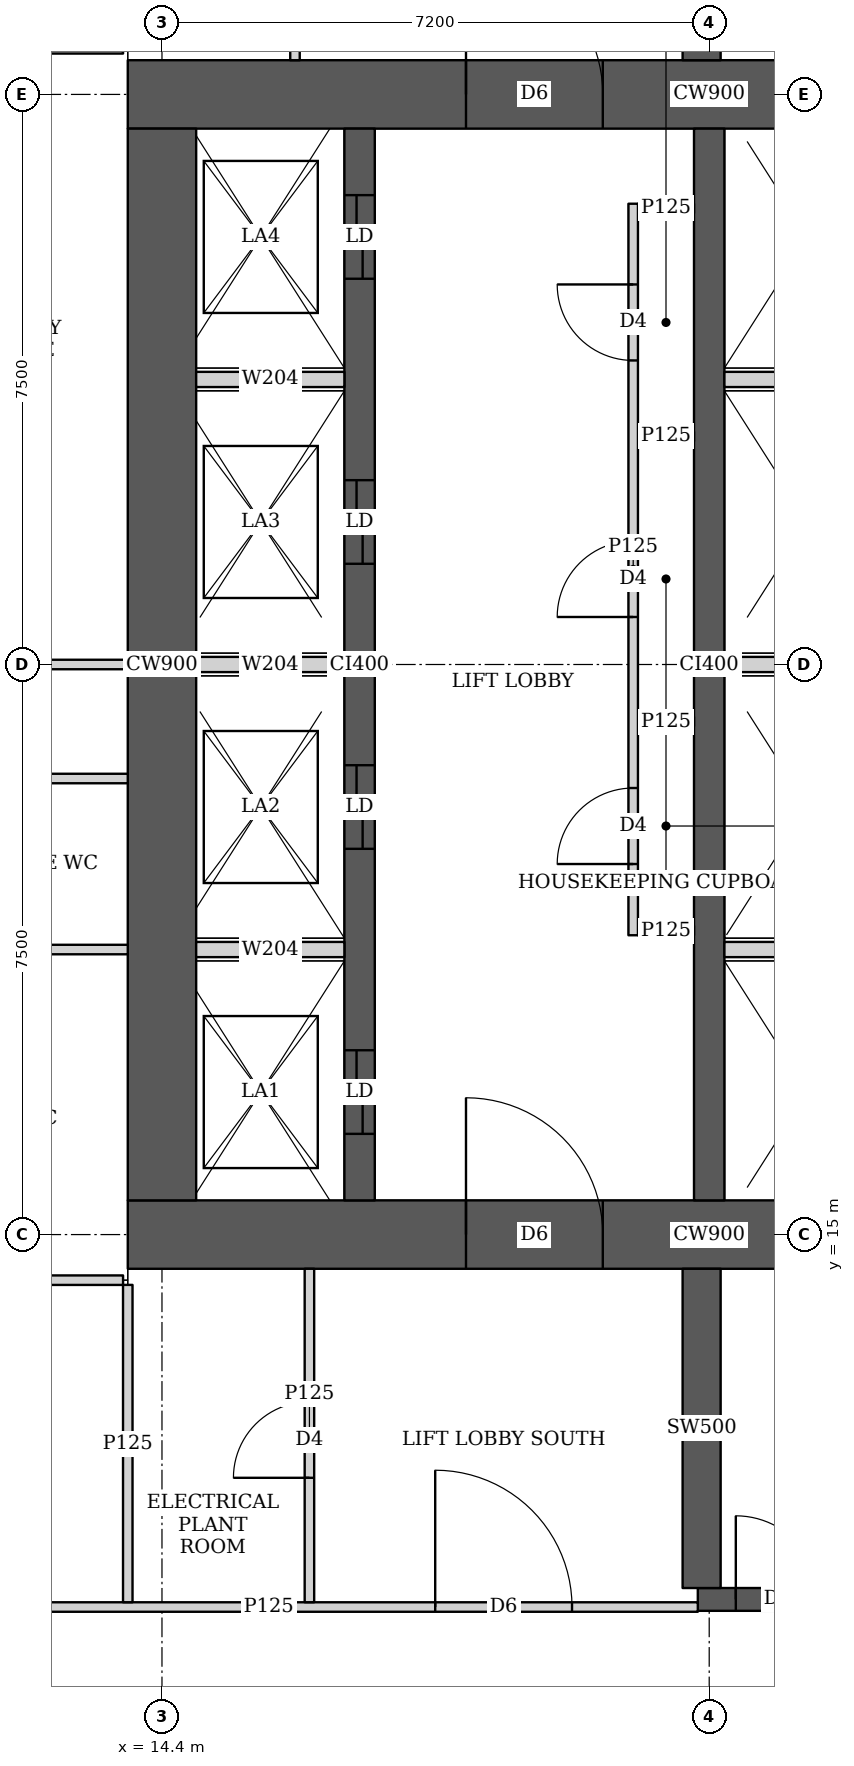
"""IFC4 building model, lengths in metres.
Left out: names, types, materials, properties, quantities, classifications, styles, units other than length and angle.
Written with IfcOpenShell. Run it as: python <this file> out.ifc"""

import sys

from ifc_helpers import new_model, si_unit, direction, frame, frame_2d, origin, place, context, subcontext, project, spatial, rectangle, extrude, element, fill, save


model = new_model("IFC4")
c1 = context("Model", 3, precision=1e-05, world=origin(), true_north=direction((0.0, 1.0)))
c2 = subcontext(c1, "Body", "Model", "MODEL_VIEW")
j1 = project(units=[si_unit("LENGTHUNIT", "METRE"), si_unit("PLANEANGLEUNIT", "RADIAN")], contexts=[c1])
p1 = place(None, origin())
s1 = spatial("IfcSite", under=j1, at=p1, CompositionType="ELEMENT")
p2 = place(p1, origin())
s2 = spatial("IfcBuilding", under=s1, at=p2, CompositionType="ELEMENT")
p3 = place(p2, frame((0.0, 0.0, 72.5)))
s3 = spatial("IfcBuildingStorey", under=s2, at=p3, CompositionType="ELEMENT", Elevation=72.5)
p4 = place(p3, frame((13.95, 15.0, 0.0), z_axis=(0.0, 0.0, 1.0), x_axis=(1.0, 0.0, 0.0)))
e1 = element("IfcWall", 1, at=p4, inside=s3, PredefinedType="SHEAR", context=c2, shape_type="SweptSolid", body=[
    extrude(rectangle(XDim=15.3, YDim=0.9, at=frame_2d((7.65, 0.0))), origin(), (0.0, 0.0, 1.0), 5.4),
])
p5 = place(p4, frame((4.45, 0.0, 0.0)))
e2 = element("IfcOpeningElement", 2, at=p5, cuts=e1, PredefinedType="OPENING", context=c2, shape_type="SweptSolid", body=[
    extrude(rectangle(XDim=1.8, YDim=2.1, at=frame_2d((0.9, 1.05))), frame((0.0, 0.46, 0.0), z_axis=(0.0, -1.0, 0.0), x_axis=(1.0, 0.0, 0.0)), (0.0, 0.0, 1.0), 0.92),
])
p6 = place(p4, frame((10.7, 0.0, 0.0)))
e3 = element("IfcOpeningElement", 3, at=p6, cuts=e1, PredefinedType="OPENING", context=c2, shape_type="SweptSolid", body=[
    extrude(rectangle(XDim=1.1, YDim=2.1, at=frame_2d((0.55, 1.05))), frame((0.0, 0.46, 0.0), z_axis=(0.0, -1.0, 0.0), x_axis=(1.0, 0.0, 0.0)), (0.0, 0.0, 1.0), 0.92),
])
p7 = place(p3, frame((13.95, 30.0, 0.0), z_axis=(0.0, 0.0, 1.0), x_axis=(1.0, 0.0, 0.0)))
e4 = element("IfcWall", 4, at=p7, inside=s3, PredefinedType="SHEAR", context=c2, shape_type="SweptSolid", body=[
    extrude(rectangle(XDim=15.3, YDim=0.9, at=frame_2d((7.65, 0.0))), origin(), (0.0, 0.0, 1.0), 5.4),
])
p8 = place(p7, frame((4.45, 0.0, 0.0)))
e5 = element("IfcOpeningElement", 5, at=p8, cuts=e4, PredefinedType="OPENING", context=c2, shape_type="SweptSolid", body=[
    extrude(rectangle(XDim=1.8, YDim=2.1, at=frame_2d((0.9, 1.05))), frame((0.0, 0.46, 0.0), z_axis=(0.0, -1.0, 0.0), x_axis=(1.0, 0.0, 0.0)), (0.0, 0.0, 1.0), 0.92),
])
p9 = place(p7, frame((10.7, 0.0, 0.0)))
e6 = element("IfcOpeningElement", 6, at=p9, cuts=e4, PredefinedType="OPENING", context=c2, shape_type="SweptSolid", body=[
    extrude(rectangle(XDim=1.1, YDim=2.1, at=frame_2d((0.55, 1.05))), frame((0.0, 0.46, 0.0), z_axis=(0.0, -1.0, 0.0), x_axis=(1.0, 0.0, 0.0)), (0.0, 0.0, 1.0), 0.92),
])
p10 = place(p3, frame((14.4, 15.45, 0.0), z_axis=(0.0, 0.0, 1.0), x_axis=(0.0, 1.0, 0.0)))
e7 = element("IfcWall", 7, at=p10, inside=s3, PredefinedType="SHEAR", context=c2, shape_type="SweptSolid", body=[
    extrude(rectangle(XDim=14.1, YDim=0.9, at=frame_2d((7.05, 0.0))), origin(), (0.0, 0.0, 1.0), 5.4),
])
p11 = place(p3, frame((17.0, 15.45, 0.0), z_axis=(0.0, 0.0, 1.0), x_axis=(0.0, 1.0, 0.0)))
e8 = element("IfcWall", 8, at=p11, inside=s3, PredefinedType="SHEAR", context=c2, shape_type="SweptSolid", body=[
    extrude(rectangle(XDim=14.1, YDim=0.4, at=frame_2d((7.05, 0.0))), origin(), (0.0, 0.0, 1.0), 5.4),
])
p12 = place(p11, frame((0.875, 0.0, 0.0)))
e9 = element("IfcOpeningElement", 9, at=p12, cuts=e8, PredefinedType="OPENING", context=c2, shape_type="SweptSolid", body=[
    extrude(rectangle(XDim=1.1, YDim=2.1, at=frame_2d((0.55, 1.05))), frame((0.0, 0.21, 0.0), z_axis=(0.0, -1.0, 0.0), x_axis=(1.0, 0.0, 0.0)), (0.0, 0.0, 1.0), 0.42),
])
p13 = place(p11, frame((4.625, 0.0, 0.0)))
e10 = element("IfcOpeningElement", 10, at=p13, cuts=e8, PredefinedType="OPENING", context=c2, shape_type="SweptSolid", body=[
    extrude(rectangle(XDim=1.1, YDim=2.1, at=frame_2d((0.55, 1.05))), frame((0.0, 0.21, 0.0), z_axis=(0.0, -1.0, 0.0), x_axis=(1.0, 0.0, 0.0)), (0.0, 0.0, 1.0), 0.42),
])
p14 = place(p11, frame((8.375, 0.0, 0.0)))
e11 = element("IfcOpeningElement", 11, at=p14, cuts=e8, PredefinedType="OPENING", context=c2, shape_type="SweptSolid", body=[
    extrude(rectangle(XDim=1.1, YDim=2.1, at=frame_2d((0.55, 1.05))), frame((0.0, 0.21, 0.0), z_axis=(0.0, -1.0, 0.0), x_axis=(1.0, 0.0, 0.0)), (0.0, 0.0, 1.0), 0.42),
])
p15 = place(p11, frame((12.125, 0.0, 0.0)))
e12 = element("IfcOpeningElement", 12, at=p15, cuts=e8, PredefinedType="OPENING", context=c2, shape_type="SweptSolid", body=[
    extrude(rectangle(XDim=1.1, YDim=2.1, at=frame_2d((0.55, 1.05))), frame((0.0, 0.21, 0.0), z_axis=(0.0, -1.0, 0.0), x_axis=(1.0, 0.0, 0.0)), (0.0, 0.0, 1.0), 0.42),
])
p16 = place(p3, frame((21.6, 15.45, 0.0), z_axis=(0.0, 0.0, 1.0), x_axis=(0.0, 1.0, 0.0)))
e13 = element("IfcWall", 13, at=p16, inside=s3, PredefinedType="SHEAR", context=c2, shape_type="SweptSolid", body=[
    extrude(rectangle(XDim=14.1, YDim=0.4, at=frame_2d((7.05, 0.0))), origin(), (0.0, 0.0, 1.0), 5.4),
])
p17 = place(p3, frame((21.45, 10.2, 0.0), z_axis=(0.0, 0.0, 1.0), x_axis=(1.0, 0.0, 0.0)))
e14 = element("IfcWall", 14, at=p17, inside=s3, PredefinedType="SHEAR", context=c2, shape_type="SweptSolid", body=[
    extrude(rectangle(XDim=7.5, YDim=0.3, at=frame_2d((3.75, 0.0))), origin(), (0.0, 0.0, 1.0), 5.4),
])
p18 = place(p17, frame((0.5, 0.0, 0.0)))
e15 = element("IfcOpeningElement", 15, at=p18, cuts=e14, PredefinedType="OPENING", context=c2, shape_type="SweptSolid", body=[
    extrude(rectangle(XDim=1.1, YDim=2.1, at=frame_2d((0.55, 1.05))), frame((0.0, 0.16, 0.0), z_axis=(0.0, -1.0, 0.0), x_axis=(1.0, 0.0, 0.0)), (0.0, 0.0, 1.0), 0.32),
])
for number, where, z_axis, x_axis in (
    (16, (21.5, 10.35, 0.0), (0.0, 0.0, 1.0), (0.0, 1.0, 0.0)),
    (17, (21.5, 30.45, 0.0), (0.0, 0.0, 1.0), (0.0, 1.0, 0.0)),
):
    element("IfcWall", number, at=place(p3, frame(where, z_axis=z_axis, x_axis=x_axis)), inside=s3, PredefinedType="SHEAR", context=c2, shape_type="SweptSolid", body=[
        extrude(rectangle(XDim=4.2, YDim=0.5, at=frame_2d((2.1, 0.0))), origin(), (0.0, 0.0, 1.0), 5.4),
    ])
p19 = place(p3, frame((10.163, 14.4, 0.0), z_axis=(0.0, 0.0, 1.0), x_axis=(1.0, 0.0, 0.0)))
e18 = element("IfcWall", 18, at=p19, inside=s3, PredefinedType="PARTITIONING", context=c2, shape_type="SweptSolid", body=[
    extrude(rectangle(XDim=3.725, YDim=0.125, at=frame_2d((1.862, 0.0))), origin(), (0.0, 0.0, 1.0), 3.55),
])
p20 = place(p3, frame((10.163, 22.5, 0.0), z_axis=(0.0, 0.0, 1.0), x_axis=(1.0, 0.0, 0.0)))
e19 = element("IfcWall", 19, at=p20, inside=s3, PredefinedType="PARTITIONING", context=c2, shape_type="SweptSolid", body=[
    extrude(rectangle(XDim=3.787, YDim=0.125, at=frame_2d((1.894, 0.0))), origin(), (0.0, 0.0, 1.0), 3.55),
])
p21 = place(p3, frame((10.163, 30.6, 0.0), z_axis=(0.0, 0.0, 1.0), x_axis=(1.0, 0.0, 0.0)))
e20 = element("IfcWall", 20, at=p21, inside=s3, PredefinedType="PARTITIONING", context=c2, shape_type="SweptSolid", body=[
    extrude(rectangle(XDim=3.725, YDim=0.125, at=frame_2d((1.862, 0.0))), origin(), (0.0, 0.0, 1.0), 3.55),
])
p22 = place(p3, frame((13.95, 10.163, 0.0), z_axis=(0.0, 0.0, 1.0), x_axis=(0.0, 1.0, 0.0)))
e21 = element("IfcWall", 21, at=p22, inside=s3, PredefinedType="PARTITIONING", context=c2, shape_type="SweptSolid", body=[
    extrude(rectangle(XDim=4.175, YDim=0.125, at=frame_2d((2.087, 0.0))), origin(), (0.0, 0.0, 1.0), 3.55),
])
p23 = place(p3, frame((10.163, 10.1, 0.0), z_axis=(0.0, 0.0, 1.0), x_axis=(1.0, 0.0, 0.0)))
e22 = element("IfcWall", 22, at=p23, inside=s3, PredefinedType="PARTITIONING", context=c2, shape_type="SweptSolid", body=[
    extrude(rectangle(XDim=11.287, YDim=0.125, at=frame_2d((5.644, 0.0))), origin(), (0.0, 0.0, 1.0), 3.15),
])
p24 = place(p23, frame((7.832, 0.0, 0.0)))
e23 = element("IfcOpeningElement", 23, at=p24, cuts=e22, PredefinedType="OPENING", context=c2, shape_type="SweptSolid", body=[
    extrude(rectangle(XDim=1.8, YDim=2.1, at=frame_2d((0.9, 1.05))), frame((0.0, 0.073, 0.0), z_axis=(0.0, -1.0, 0.0), x_axis=(1.0, 0.0, 0.0)), (0.0, 0.0, 1.0), 0.145),
])
p25 = place(p3, frame((16.34, 10.163, 0.0), z_axis=(0.0, 0.0, 1.0), x_axis=(0.0, 1.0, 0.0)))
e24 = element("IfcWall", 24, at=p25, inside=s3, PredefinedType="PARTITIONING", context=c2, shape_type="SweptSolid", body=[
    extrude(rectangle(XDim=4.387, YDim=0.125, at=frame_2d((2.193, 0.0))), origin(), (0.0, 0.0, 1.0), 5.15),
])
p26 = place(p25, frame((1.637, 0.0, 0.0)))
e25 = element("IfcOpeningElement", 25, at=p26, cuts=e24, PredefinedType="OPENING", context=c2, shape_type="SweptSolid", body=[
    extrude(rectangle(XDim=1.0, YDim=2.1, at=frame_2d((0.5, 1.05))), frame((0.0, 0.073, 0.0), z_axis=(0.0, -1.0, 0.0), x_axis=(1.0, 0.0, 0.0)), (0.0, 0.0, 1.0), 0.145),
])
p27 = place(p3, frame((16.15, 30.45, 0.0), z_axis=(0.0, 0.0, 1.0), x_axis=(0.0, 1.0, 0.0)))
e26 = element("IfcWall", 26, at=p27, inside=s3, PredefinedType="PARTITIONING", context=c2, shape_type="SweptSolid", body=[
    extrude(rectangle(XDim=4.387, YDim=0.125, at=frame_2d((2.193, 0.0))), origin(), (0.0, 0.0, 1.0), 5.15),
])
p28 = place(p27, frame((1.75, 0.0, 0.0)))
e27 = element("IfcOpeningElement", 27, at=p28, cuts=e26, PredefinedType="OPENING", context=c2, shape_type="SweptSolid", body=[
    extrude(rectangle(XDim=1.0, YDim=2.1, at=frame_2d((0.5, 1.05))), frame((0.0, 0.073, 0.0), z_axis=(0.0, -1.0, 0.0), x_axis=(1.0, 0.0, 0.0)), (0.0, 0.0, 1.0), 0.145),
])
for number, where, z_axis, x_axis in (
    (28, (10.163, 18.75, 0.0), (0.0, 0.0, 1.0), (1.0, 0.0, 0.0)),
    (29, (10.163, 21.0, 0.0), (0.0, 0.0, 1.0), (1.0, 0.0, 0.0)),
):
    element("IfcWall", number, at=place(p3, frame(where, z_axis=z_axis, x_axis=x_axis)), inside=s3, PredefinedType="PARTITIONING", context=c2, shape_type="SweptSolid", body=[
        extrude(rectangle(XDim=3.787, YDim=0.125, at=frame_2d((1.894, 0.0))), origin(), (0.0, 0.0, 1.0), 5.15),
    ])
p29 = place(p3, frame((20.6, 18.938, 0.0), z_axis=(0.0, 0.0, 1.0), x_axis=(0.0, 1.0, 0.0)))
e30 = element("IfcWall", 30, at=p29, inside=s3, PredefinedType="PARTITIONING", context=c2, shape_type="SweptSolid", body=[
    extrude(rectangle(XDim=9.624, YDim=0.125, at=frame_2d((4.812, 0.0))), origin(), (0.0, 0.0, 1.0), 5.15),
])
p30 = place(p29, frame((0.937, 0.0, 0.0)))
e31 = element("IfcOpeningElement", 31, at=p30, cuts=e30, PredefinedType="OPENING", context=c2, shape_type="SweptSolid", body=[
    extrude(rectangle(XDim=1.0, YDim=2.1, at=frame_2d((0.5, 1.05))), frame((0.0, 0.073, 0.0), z_axis=(0.0, -1.0, 0.0), x_axis=(1.0, 0.0, 0.0)), (0.0, 0.0, 1.0), 0.145),
])
p31 = place(p29, frame((4.187, 0.0, 0.0)))
e32 = element("IfcOpeningElement", 32, at=p31, cuts=e30, PredefinedType="OPENING", context=c2, shape_type="SweptSolid", body=[
    extrude(rectangle(XDim=1.0, YDim=2.1, at=frame_2d((0.5, 1.05))), frame((0.0, 0.073, 0.0), z_axis=(0.0, -1.0, 0.0), x_axis=(1.0, 0.0, 0.0)), (0.0, 0.0, 1.0), 0.145),
])
p32 = place(p29, frame((7.562, 0.0, 0.0)))
e33 = element("IfcOpeningElement", 33, at=p32, cuts=e30, PredefinedType="OPENING", context=c2, shape_type="SweptSolid", body=[
    extrude(rectangle(XDim=1.0, YDim=2.1, at=frame_2d((0.5, 1.05))), frame((0.0, 0.073, 0.0), z_axis=(0.0, -1.0, 0.0), x_axis=(1.0, 0.0, 0.0)), (0.0, 0.0, 1.0), 0.145),
])
for number, where, z_axis, x_axis in (
    (34, (20.663, 19.0, 0.0), (0.0, 0.0, 1.0), (1.0, 0.0, 0.0)),
    (35, (20.663, 28.5, 0.0), (0.0, 0.0, 1.0), (1.0, 0.0, 0.0)),
    (36, (20.663, 21.75, 0.0), (0.0, 0.0, 1.0), (1.0, 0.0, 0.0)),
    (37, (20.663, 25.5, 0.0), (0.0, 0.0, 1.0), (1.0, 0.0, 0.0)),
):
    element("IfcWall", number, at=place(p3, frame(where, z_axis=z_axis, x_axis=x_axis)), inside=s3, PredefinedType="PARTITIONING", context=c2, shape_type="SweptSolid", body=[
        extrude(rectangle(XDim=0.737, YDim=0.125, at=frame_2d((0.368, 0.0))), origin(), (0.0, 0.0, 1.0), 5.15),
    ])
p33 = place(p3, frame((14.85, 18.75, 0.0), z_axis=(0.0, 0.0, 1.0), x_axis=(1.0, 0.0, 0.0)))
e38 = element("IfcWall", 38, at=p33, inside=s3, PredefinedType="SOLIDWALL", context=c2, shape_type="SweptSolid", body=[
    extrude(rectangle(XDim=1.95, YDim=0.2, at=frame_2d((0.975, 0.0))), origin(), (0.0, 0.0, 1.0), 5.15),
])
p34 = place(p3, frame((21.8, 18.75, 0.0), z_axis=(0.0, 0.0, 1.0), x_axis=(1.0, 0.0, 0.0)))
e39 = element("IfcWall", 39, at=p34, inside=s3, PredefinedType="SOLIDWALL", context=c2, shape_type="SweptSolid", body=[
    extrude(rectangle(XDim=2.2, YDim=0.2, at=frame_2d((1.1, 0.0))), origin(), (0.0, 0.0, 1.0), 5.15),
])
p35 = place(p3, frame((14.85, 22.5, 0.0), z_axis=(0.0, 0.0, 1.0), x_axis=(1.0, 0.0, 0.0)))
e40 = element("IfcWall", 40, at=p35, inside=s3, PredefinedType="SOLIDWALL", context=c2, shape_type="SweptSolid", body=[
    extrude(rectangle(XDim=1.95, YDim=0.2, at=frame_2d((0.975, 0.0))), origin(), (0.0, 0.0, 1.0), 5.15),
])
p36 = place(p3, frame((21.8, 22.5, 0.0), z_axis=(0.0, 0.0, 1.0), x_axis=(1.0, 0.0, 0.0)))
e41 = element("IfcWall", 41, at=p36, inside=s3, PredefinedType="SOLIDWALL", context=c2, shape_type="SweptSolid", body=[
    extrude(rectangle(XDim=2.2, YDim=0.2, at=frame_2d((1.1, 0.0))), origin(), (0.0, 0.0, 1.0), 5.15),
])
p37 = place(p3, frame((14.85, 26.25, 0.0), z_axis=(0.0, 0.0, 1.0), x_axis=(1.0, 0.0, 0.0)))
e42 = element("IfcWall", 42, at=p37, inside=s3, PredefinedType="SOLIDWALL", context=c2, shape_type="SweptSolid", body=[
    extrude(rectangle(XDim=1.95, YDim=0.2, at=frame_2d((0.975, 0.0))), origin(), (0.0, 0.0, 1.0), 5.15),
])
p38 = place(p3, frame((21.8, 26.25, 0.0), z_axis=(0.0, 0.0, 1.0), x_axis=(1.0, 0.0, 0.0)))
e43 = element("IfcWall", 43, at=p38, inside=s3, PredefinedType="SOLIDWALL", context=c2, shape_type="SweptSolid", body=[
    extrude(rectangle(XDim=2.2, YDim=0.2, at=frame_2d((1.1, 0.0))), origin(), (0.0, 0.0, 1.0), 5.15),
])
p39 = place(p26, origin())
e44 = element("IfcDoor", 44, at=p39, inside=s3, OperationType="SINGLE_SWING_LEFT", PredefinedType="DOOR", context=c2, shape_type="SweptSolid", body=[
    extrude(rectangle(XDim=1.0, YDim=2.1, at=frame_2d((0.5, 1.05))), frame((0.0, 0.025, 0.0), z_axis=(0.0, -1.0, 0.0), x_axis=(1.0, 0.0, 0.0)), (0.0, 0.0, 1.0), 0.05),
])
fill(e25, e44)
p40 = place(p24, origin())
e45 = element("IfcDoor", 45, at=p40, inside=s3, OperationType="DOUBLE_DOOR_SINGLE_SWING", PredefinedType="DOOR", context=c2, shape_type="SweptSolid", body=[
    extrude(rectangle(XDim=1.8, YDim=2.1, at=frame_2d((0.9, 1.05))), frame((0.0, 0.025, 0.0), z_axis=(0.0, -1.0, 0.0), x_axis=(1.0, 0.0, 0.0)), (0.0, 0.0, 1.0), 0.05),
])
fill(e23, e45)
p41 = place(p30, origin())
e46 = element("IfcDoor", 46, at=p41, inside=s3, OperationType="SINGLE_SWING_LEFT", PredefinedType="DOOR", context=c2, shape_type="SweptSolid", body=[
    extrude(rectangle(XDim=1.0, YDim=2.1, at=frame_2d((0.5, 1.05))), frame((0.0, 0.025, 0.0), z_axis=(0.0, -1.0, 0.0), x_axis=(1.0, 0.0, 0.0)), (0.0, 0.0, 1.0), 0.05),
])
fill(e31, e46)
p42 = place(p31, origin())
e47 = element("IfcDoor", 47, at=p42, inside=s3, OperationType="SINGLE_SWING_LEFT", PredefinedType="DOOR", context=c2, shape_type="SweptSolid", body=[
    extrude(rectangle(XDim=1.0, YDim=2.1, at=frame_2d((0.5, 1.05))), frame((0.0, 0.025, 0.0), z_axis=(0.0, -1.0, 0.0), x_axis=(1.0, 0.0, 0.0)), (0.0, 0.0, 1.0), 0.05),
])
fill(e32, e47)
p43 = place(p32, origin())
e48 = element("IfcDoor", 48, at=p43, inside=s3, OperationType="SINGLE_SWING_RIGHT", PredefinedType="DOOR", context=c2, shape_type="SweptSolid", body=[
    extrude(rectangle(XDim=1.0, YDim=2.1, at=frame_2d((0.5, 1.05))), frame((0.0, 0.025, 0.0), z_axis=(0.0, -1.0, 0.0), x_axis=(1.0, 0.0, 0.0)), (0.0, 0.0, 1.0), 0.05),
])
fill(e33, e48)
p44 = place(p5, origin())
e49 = element("IfcDoor", 49, at=p44, inside=s3, OperationType="DOUBLE_DOOR_SINGLE_SWING", PredefinedType="DOOR", context=c2, shape_type="SweptSolid", body=[
    extrude(rectangle(XDim=1.8, YDim=2.1, at=frame_2d((0.9, 1.05))), frame((0.0, 0.025, 0.0), z_axis=(0.0, -1.0, 0.0), x_axis=(1.0, 0.0, 0.0)), (0.0, 0.0, 1.0), 0.05),
])
fill(e2, e49)
p45 = place(p8, origin())
e50 = element("IfcDoor", 50, at=p45, inside=s3, OperationType="DOUBLE_DOOR_SINGLE_SWING", PredefinedType="DOOR", context=c2, shape_type="SweptSolid", body=[
    extrude(rectangle(XDim=1.8, YDim=2.1, at=frame_2d((0.9, 1.05))), frame((0.0, 0.025, 0.0), z_axis=(0.0, -1.0, 0.0), x_axis=(1.0, 0.0, 0.0)), (0.0, 0.0, 1.0), 0.05),
])
fill(e5, e50)
p46 = place(p12, origin())
e51 = element("IfcDoor", 51, at=p46, inside=s3, OperationType="DOUBLE_DOOR_SLIDING", PredefinedType="DOOR", context=c2, shape_type="SweptSolid", body=[
    extrude(rectangle(XDim=1.1, YDim=2.1, at=frame_2d((0.55, 1.05))), frame((0.0, 0.025, 0.0), z_axis=(0.0, -1.0, 0.0), x_axis=(1.0, 0.0, 0.0)), (0.0, 0.0, 1.0), 0.05),
])
fill(e9, e51)
p47 = place(p13, origin())
e52 = element("IfcDoor", 52, at=p47, inside=s3, OperationType="DOUBLE_DOOR_SLIDING", PredefinedType="DOOR", context=c2, shape_type="SweptSolid", body=[
    extrude(rectangle(XDim=1.1, YDim=2.1, at=frame_2d((0.55, 1.05))), frame((0.0, 0.025, 0.0), z_axis=(0.0, -1.0, 0.0), x_axis=(1.0, 0.0, 0.0)), (0.0, 0.0, 1.0), 0.05),
])
fill(e10, e52)
p48 = place(p14, origin())
e53 = element("IfcDoor", 53, at=p48, inside=s3, OperationType="DOUBLE_DOOR_SLIDING", PredefinedType="DOOR", context=c2, shape_type="SweptSolid", body=[
    extrude(rectangle(XDim=1.1, YDim=2.1, at=frame_2d((0.55, 1.05))), frame((0.0, 0.025, 0.0), z_axis=(0.0, -1.0, 0.0), x_axis=(1.0, 0.0, 0.0)), (0.0, 0.0, 1.0), 0.05),
])
fill(e11, e53)
p49 = place(p15, origin())
e54 = element("IfcDoor", 54, at=p49, inside=s3, OperationType="DOUBLE_DOOR_SLIDING", PredefinedType="DOOR", context=c2, shape_type="SweptSolid", body=[
    extrude(rectangle(XDim=1.1, YDim=2.1, at=frame_2d((0.55, 1.05))), frame((0.0, 0.025, 0.0), z_axis=(0.0, -1.0, 0.0), x_axis=(1.0, 0.0, 0.0)), (0.0, 0.0, 1.0), 0.05),
])
fill(e12, e54)
p50 = place(p18, origin())
e55 = element("IfcDoor", 55, at=p50, inside=s3, OperationType="SINGLE_SWING_LEFT", PredefinedType="DOOR", context=c2, shape_type="SweptSolid", body=[
    extrude(rectangle(XDim=1.1, YDim=2.1, at=frame_2d((0.55, 1.05))), frame((0.0, 0.025, 0.0), z_axis=(0.0, -1.0, 0.0), x_axis=(1.0, 0.0, 0.0)), (0.0, 0.0, 1.0), 0.05),
])
fill(e15, e55)
save(model, sys.argv[1])
